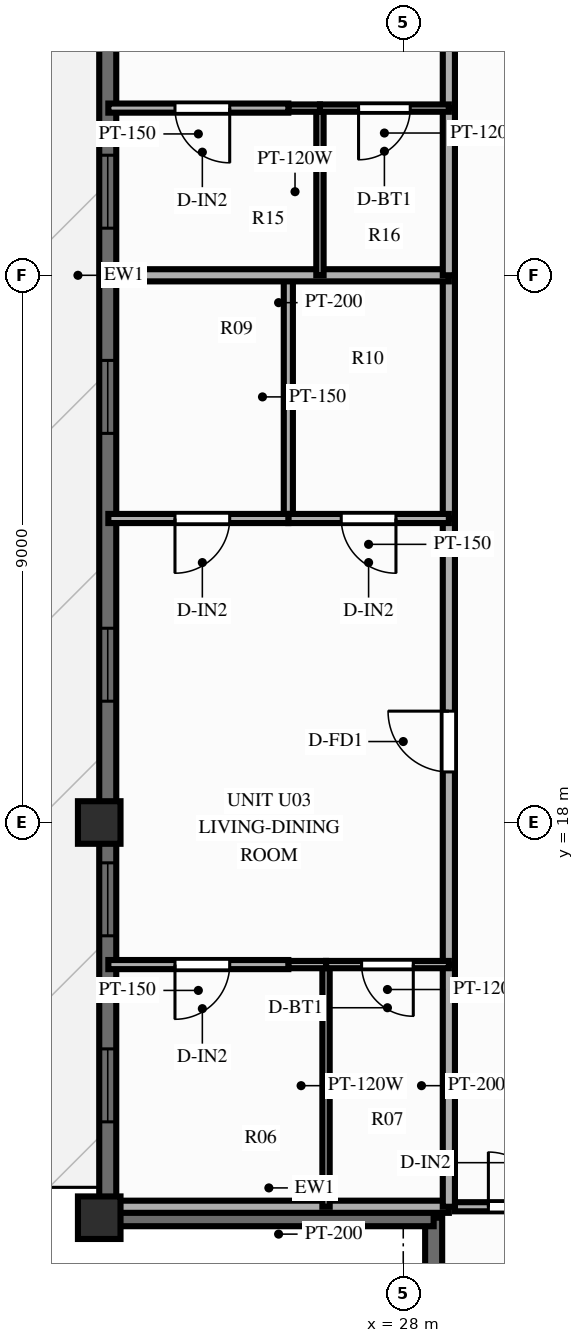
"""IFC4 building model, lengths in metres.
Left out: names, types, materials, properties, quantities, classifications, styles, units other than length and angle.
Written with IfcOpenShell. Run it as: python <this file> out.ifc"""

import sys

from ifc_helpers import new_model, si_unit, direction, frame, frame_2d, origin, origin_2d, place, context, subcontext, project, spatial, rectangle, extrude, source, transform, mapped, element, fill, save


model = new_model("IFC4")
c1 = context("Model", 3, precision=1e-05, world=origin(), true_north=direction((0.0, 1.0)))
c2 = subcontext(c1, "Body", "Model", "MODEL_VIEW")
j1 = project(units=[si_unit("LENGTHUNIT", "METRE"), si_unit("PLANEANGLEUNIT", "RADIAN")], contexts=[c1])
p1 = place(None, origin())
s1 = spatial("IfcSite", under=j1, at=p1, CompositionType="ELEMENT")
p2 = place(p1, origin())
s2 = spatial("IfcBuilding", under=s1, at=p2, CompositionType="ELEMENT")
p3 = place(p2, frame((0.0, 0.0, 243.0)))
s3 = spatial("IfcBuildingStorey", under=s2, at=p3, CompositionType="ELEMENT", Elevation=243.0)
m1 = source(origin(), c2, "Body", "SweptSolid", [
    extrude(rectangle(XDim=0.7, YDim=0.7, at=origin_2d()), origin(), (0.0, 0.0, 1.0), 3.0),
])
for number, where, z_axis, x_axis in (
    (1, (23.0, 18.0, 0.0), (0.0, 0.0, 1.0), (1.0, 0.0, 0.0)),
    (2, (23.0, 11.5, 0.0), (0.0, 0.0, 1.0), (1.0, 0.0, 0.0)),
):
    element("IfcColumn", number, at=place(p3, frame(where, z_axis=z_axis, x_axis=x_axis)), inside=s3, PredefinedType="COLUMN", context=c2, shape_type="MappedRepresentation", body=[
        mapped(m1, transform((0.0, 0.0, 0.0), scale=1.0)),
    ])
p4 = place(p3, frame((23.14, 11.5, 0.0), z_axis=(0.0, 0.0, 1.0), x_axis=(0.0, 1.0, 0.0)))
e3 = element("IfcWall", 3, at=p4, inside=s3, PredefinedType="SOLIDWALL", context=c2, shape_type="SweptSolid", body=[
    extrude(rectangle(XDim=31.0, YDim=0.28, at=frame_2d((15.5, 0.0))), origin(), (0.0, 0.0, 1.0), 2.28),
])
p5 = place(p4, frame((1.577, 0.0, 0.25)))
e4 = element("IfcOpeningElement", 4, at=p5, cuts=e3, PredefinedType="OPENING", context=c2, shape_type="SweptSolid", body=[
    extrude(rectangle(XDim=1.2, YDim=1.5, at=frame_2d((0.6, 0.75))), frame((0.0, 0.152, 0.0), z_axis=(0.0, -1.0, 0.0), x_axis=(1.0, 0.0, 0.0)), (0.0, 0.0, 1.0), 0.304),
])
p6 = place(p4, frame((4.637, 0.0, 0.25)))
e5 = element("IfcOpeningElement", 5, at=p6, cuts=e3, PredefinedType="OPENING", context=c2, shape_type="SweptSolid", body=[
    extrude(rectangle(XDim=1.2, YDim=1.5, at=frame_2d((0.6, 0.75))), frame((0.0, 0.152, 0.0), z_axis=(0.0, -1.0, 0.0), x_axis=(1.0, 0.0, 0.0)), (0.0, 0.0, 1.0), 0.304),
])
p7 = place(p4, frame((8.495, 0.0, 0.25)))
e6 = element("IfcOpeningElement", 6, at=p7, cuts=e3, PredefinedType="OPENING", context=c2, shape_type="SweptSolid", body=[
    extrude(rectangle(XDim=1.2, YDim=1.5, at=frame_2d((0.6, 0.75))), frame((0.0, 0.152, 0.0), z_axis=(0.0, -1.0, 0.0), x_axis=(1.0, 0.0, 0.0)), (0.0, 0.0, 1.0), 0.304),
])
p8 = place(p4, frame((12.9, 0.0, 0.25)))
e7 = element("IfcOpeningElement", 7, at=p8, cuts=e3, PredefinedType="OPENING", context=c2, shape_type="SweptSolid", body=[
    extrude(rectangle(XDim=1.2, YDim=1.5, at=frame_2d((0.6, 0.75))), frame((0.0, 0.152, 0.0), z_axis=(0.0, -1.0, 0.0), x_axis=(1.0, 0.0, 0.0)), (0.0, 0.0, 1.0), 0.304),
])
p9 = place(p4, frame((16.275, 0.0, 0.25)))
e8 = element("IfcOpeningElement", 8, at=p9, cuts=e3, PredefinedType="OPENING", context=c2, shape_type="SweptSolid", body=[
    extrude(rectangle(XDim=1.2, YDim=1.5, at=frame_2d((0.6, 0.75))), frame((0.0, 0.152, 0.0), z_axis=(0.0, -1.0, 0.0), x_axis=(1.0, 0.0, 0.0)), (0.0, 0.0, 1.0), 0.304),
])
p10 = place(p4, frame((20.48, 0.0, 0.0)))
e9 = element("IfcOpeningElement", 9, at=p10, cuts=e3, PredefinedType="OPENING", context=c2, shape_type="SweptSolid", body=[
    extrude(rectangle(XDim=1.6, YDim=2.15, at=frame_2d((0.8, 1.075))), frame((0.0, 0.152, 0.0), z_axis=(0.0, -1.0, 0.0), x_axis=(1.0, 0.0, 0.0)), (0.0, 0.0, 1.0), 0.304),
])
p11 = place(p4, frame((25.155, 0.0, 0.25)))
e10 = element("IfcOpeningElement", 10, at=p11, cuts=e3, PredefinedType="OPENING", context=c2, shape_type="SweptSolid", body=[
    extrude(rectangle(XDim=1.2, YDim=1.5, at=frame_2d((0.6, 0.75))), frame((0.0, 0.152, 0.0), z_axis=(0.0, -1.0, 0.0), x_axis=(1.0, 0.0, 0.0)), (0.0, 0.0, 1.0), 0.304),
])
p12 = place(p4, frame((28.215, 0.0, 0.25)))
e11 = element("IfcOpeningElement", 11, at=p12, cuts=e3, PredefinedType="OPENING", context=c2, shape_type="SweptSolid", body=[
    extrude(rectangle(XDim=1.2, YDim=1.5, at=frame_2d((0.6, 0.75))), frame((0.0, 0.152, 0.0), z_axis=(0.0, -1.0, 0.0), x_axis=(1.0, 0.0, 0.0)), (0.0, 0.0, 1.0), 0.304),
])
for number, where, z_axis, x_axis in (
    (12, (28.5, 6.08, 0.0), (0.0, 0.0, 1.0), (0.0, 1.0, 0.0)),
    (13, (23.08, 11.5, 0.0), (0.0, 0.0, 1.0), (1.0, 0.0, 0.0)),
):
    element("IfcWall", number, at=place(p3, frame(where, z_axis=z_axis, x_axis=x_axis)), inside=s3, PredefinedType="SOLIDWALL", context=c2, shape_type="SweptSolid", body=[
        extrude(rectangle(XDim=5.42, YDim=0.28, at=frame_2d((2.71, 0.0))), origin(), (0.0, 0.0, 1.0), 2.28),
    ])
p13 = place(p3, frame((28.85, 11.68, 0.0), z_axis=(0.0, 0.0, 1.0), x_axis=(1.0, 0.0, 0.0)))
e14 = element("IfcWall", 14, at=p13, inside=s3, PredefinedType="PARTITIONING", context=c2, shape_type="SweptSolid", body=[
    extrude(rectangle(XDim=2.33, YDim=0.15, at=frame_2d((1.165, 0.0))), origin(), (0.0, 0.0, 1.0), 2.79),
])
p14 = place(p13, frame((0.55, 0.0, 0.0)))
e15 = element("IfcOpeningElement", 15, at=p14, cuts=e14, PredefinedType="OPENING", context=c2, shape_type="SweptSolid", body=[
    extrude(rectangle(XDim=0.9, YDim=2.1, at=frame_2d((0.45, 1.05))), frame((0.0, 0.087, 0.0), z_axis=(0.0, -1.0, 0.0), x_axis=(1.0, 0.0, 0.0)), (0.0, 0.0, 1.0), 0.174),
])
p15 = place(p3, frame((28.75, 11.68, 0.0), z_axis=(0.0, 0.0, 1.0), x_axis=(-1.0, 0.0, 0.0)))
e16 = element("IfcWall", 16, at=p15, inside=s3, PredefinedType="PARTITIONING", context=c2, shape_type="SweptSolid", body=[
    extrude(rectangle(XDim=5.6, YDim=0.2, at=frame_2d((2.8, 0.0))), origin(), (0.0, 0.0, 1.0), 2.79),
])
p16 = place(p3, frame((28.75, 11.68, 0.0), z_axis=(0.0, 0.0, 1.0), x_axis=(0.0, 1.0, 0.0)))
e17 = element("IfcWall", 17, at=p16, inside=s3, PredefinedType="PARTITIONING", context=c2, shape_type="SweptSolid", body=[
    extrude(rectangle(XDim=3.983, YDim=0.2, at=frame_2d((1.992, 0.0))), origin(), (0.0, 0.0, 1.0), 2.79),
])
p17 = place(p3, frame((28.75, 15.663, 0.0), z_axis=(0.0, 0.0, 1.0), x_axis=(0.0, 1.0, 0.0)))
e18 = element("IfcWall", 18, at=p17, inside=s3, PredefinedType="PARTITIONING", context=c2, shape_type="SweptSolid", body=[
    extrude(rectangle(XDim=7.337, YDim=0.2, at=frame_2d((3.668, 0.0))), origin(), (0.0, 0.0, 1.0), 2.79),
])
p18 = place(p17, frame((3.168, 0.0, 0.0)))
e19 = element("IfcOpeningElement", 19, at=p18, cuts=e18, PredefinedType="OPENING", context=c2, shape_type="SweptSolid", body=[
    extrude(rectangle(XDim=1.0, YDim=2.15, at=frame_2d((0.5, 1.075))), frame((0.0, 0.112, 0.0), z_axis=(0.0, -1.0, 0.0), x_axis=(1.0, 0.0, 0.0)), (0.0, 0.0, 1.0), 0.224),
])
p19 = place(p3, frame((28.75, 23.0, 0.0), z_axis=(0.0, 0.0, 1.0), x_axis=(0.0, 1.0, 0.0)))
e20 = element("IfcWall", 20, at=p19, inside=s3, PredefinedType="PARTITIONING", context=c2, shape_type="SweptSolid", body=[
    extrude(rectangle(XDim=4.0, YDim=0.2, at=frame_2d((2.0, 0.0))), origin(), (0.0, 0.0, 1.0), 2.79),
])
p20 = place(p3, frame((26.73, 11.68, 0.0), z_axis=(0.0, 0.0, 1.0), x_axis=(0.0, 1.0, 0.0)))
e21 = element("IfcWall", 21, at=p20, inside=s3, PredefinedType="PARTITIONING", context=c2, shape_type="SweptSolid", body=[
    extrude(rectangle(XDim=3.983, YDim=0.12, at=frame_2d((1.992, 0.0))), origin(), (0.0, 0.0, 1.0), 2.79),
])
p21 = place(p3, frame((26.11, 23.0, 0.0), z_axis=(0.0, 0.0, 1.0), x_axis=(0.0, 1.0, 0.0)))
e22 = element("IfcWall", 22, at=p21, inside=s3, PredefinedType="PARTITIONING", context=c2, shape_type="SweptSolid", body=[
    extrude(rectangle(XDim=4.0, YDim=0.15, at=frame_2d((2.0, 0.0))), origin(), (0.0, 0.0, 1.0), 2.79),
])
p22 = place(p3, frame((28.75, 15.663, 0.0), z_axis=(0.0, 0.0, 1.0), x_axis=(-1.0, 0.0, 0.0)))
e23 = element("IfcWall", 23, at=p22, inside=s3, PredefinedType="PARTITIONING", context=c2, shape_type="SweptSolid", body=[
    extrude(rectangle(XDim=2.02, YDim=0.12, at=frame_2d((1.01, 0.0))), origin(), (0.0, 0.0, 1.0), 2.79),
])
p23 = place(p22, frame((0.585, 0.0, 0.0)))
e24 = element("IfcOpeningElement", 24, at=p23, cuts=e23, PredefinedType="OPENING", context=c2, shape_type="SweptSolid", body=[
    extrude(rectangle(XDim=0.85, YDim=2.05, at=frame_2d((0.425, 1.025))), frame((0.0, 0.072, 0.0), z_axis=(0.0, -1.0, 0.0), x_axis=(1.0, 0.0, 0.0)), (0.0, 0.0, 1.0), 0.144),
])
p24 = place(p3, frame((26.73, 15.663, 0.0), z_axis=(0.0, 0.0, 1.0), x_axis=(-1.0, 0.0, 0.0)))
e25 = element("IfcWall", 25, at=p24, inside=s3, PredefinedType="PARTITIONING", context=c2, shape_type="SweptSolid", body=[
    extrude(rectangle(XDim=0.62, YDim=0.12, at=frame_2d((0.31, 0.0))), origin(), (0.0, 0.0, 1.0), 2.79),
])
p25 = place(p3, frame((26.11, 15.663, 0.0), z_axis=(0.0, 0.0, 1.0), x_axis=(-1.0, 0.0, 0.0)))
e26 = element("IfcWall", 26, at=p25, inside=s3, PredefinedType="PARTITIONING", context=c2, shape_type="SweptSolid", body=[
    extrude(rectangle(XDim=2.96, YDim=0.15, at=frame_2d((1.48, 0.0))), origin(), (0.0, 0.0, 1.0), 2.79),
])
p26 = place(p25, frame((0.964, 0.0, 0.0)))
e27 = element("IfcOpeningElement", 27, at=p26, cuts=e26, PredefinedType="OPENING", context=c2, shape_type="SweptSolid", body=[
    extrude(rectangle(XDim=0.9, YDim=2.1, at=frame_2d((0.45, 1.05))), frame((0.0, 0.087, 0.0), z_axis=(0.0, -1.0, 0.0), x_axis=(1.0, 0.0, 0.0)), (0.0, 0.0, 1.0), 0.174),
])
p27 = place(p3, frame((28.75, 23.0, 0.0), z_axis=(0.0, 0.0, 1.0), x_axis=(-1.0, 0.0, 0.0)))
e28 = element("IfcWall", 28, at=p27, inside=s3, PredefinedType="PARTITIONING", context=c2, shape_type="SweptSolid", body=[
    extrude(rectangle(XDim=2.64, YDim=0.15, at=frame_2d((1.32, 0.0))), origin(), (0.0, 0.0, 1.0), 2.79),
])
p28 = place(p27, frame((0.87, 0.0, 0.0)))
e29 = element("IfcOpeningElement", 29, at=p28, cuts=e28, PredefinedType="OPENING", context=c2, shape_type="SweptSolid", body=[
    extrude(rectangle(XDim=0.9, YDim=2.1, at=frame_2d((0.45, 1.05))), frame((0.0, 0.087, 0.0), z_axis=(0.0, -1.0, 0.0), x_axis=(1.0, 0.0, 0.0)), (0.0, 0.0, 1.0), 0.174),
])
p29 = place(p3, frame((26.11, 23.0, 0.0), z_axis=(0.0, 0.0, 1.0), x_axis=(-1.0, 0.0, 0.0)))
e30 = element("IfcWall", 30, at=p29, inside=s3, PredefinedType="PARTITIONING", context=c2, shape_type="SweptSolid", body=[
    extrude(rectangle(XDim=2.96, YDim=0.15, at=frame_2d((1.48, 0.0))), origin(), (0.0, 0.0, 1.0), 2.79),
])
p30 = place(p29, frame((0.964, 0.0, 0.0)))
e31 = element("IfcOpeningElement", 31, at=p30, cuts=e30, PredefinedType="OPENING", context=c2, shape_type="SweptSolid", body=[
    extrude(rectangle(XDim=0.9, YDim=2.1, at=frame_2d((0.45, 1.05))), frame((0.0, 0.087, 0.0), z_axis=(0.0, -1.0, 0.0), x_axis=(1.0, 0.0, 0.0)), (0.0, 0.0, 1.0), 0.174),
])
p31 = place(p3, frame((28.75, 27.0, 0.0), z_axis=(0.0, 0.0, 1.0), x_axis=(-1.0, 0.0, 0.0)))
e32 = element("IfcWall", 32, at=p31, inside=s3, PredefinedType="PARTITIONING", context=c2, shape_type="SweptSolid", body=[
    extrude(rectangle(XDim=5.6, YDim=0.2, at=frame_2d((2.8, 0.0))), origin(), (0.0, 0.0, 1.0), 2.79),
])
p32 = place(p3, frame((28.75, 27.0, 0.0), z_axis=(0.0, 0.0, 1.0), x_axis=(0.0, 1.0, 0.0)))
e33 = element("IfcWall", 33, at=p32, inside=s3, PredefinedType="PARTITIONING", context=c2, shape_type="SweptSolid", body=[
    extrude(rectangle(XDim=2.75, YDim=0.2, at=frame_2d((1.375, 0.0))), origin(), (0.0, 0.0, 1.0), 2.79),
])
p33 = place(p3, frame((28.75, 29.75, 0.0), z_axis=(0.0, 0.0, 1.0), x_axis=(0.0, 1.0, 0.0)))
e34 = element("IfcWall", 34, at=p33, inside=s3, PredefinedType="PARTITIONING", context=c2, shape_type="SweptSolid", body=[
    extrude(rectangle(XDim=8.57, YDim=0.2, at=frame_2d((4.285, 0.0))), origin(), (0.0, 0.0, 1.0), 2.79),
])
p34 = place(p33, frame((3.785, 0.0, 0.0)))
e35 = element("IfcOpeningElement", 35, at=p34, cuts=e34, PredefinedType="OPENING", context=c2, shape_type="SweptSolid", body=[
    extrude(rectangle(XDim=1.0, YDim=2.15, at=frame_2d((0.5, 1.075))), frame((0.0, 0.112, 0.0), z_axis=(0.0, -1.0, 0.0), x_axis=(1.0, 0.0, 0.0)), (0.0, 0.0, 1.0), 0.224),
])
p35 = place(p3, frame((26.63, 27.0, 0.0), z_axis=(0.0, 0.0, 1.0), x_axis=(0.0, 1.0, 0.0)))
e36 = element("IfcWall", 36, at=p35, inside=s3, PredefinedType="PARTITIONING", context=c2, shape_type="SweptSolid", body=[
    extrude(rectangle(XDim=2.75, YDim=0.12, at=frame_2d((1.375, 0.0))), origin(), (0.0, 0.0, 1.0), 2.39),
])
p36 = place(p3, frame((28.75, 29.75, 0.0), z_axis=(0.0, 0.0, 1.0), x_axis=(-1.0, 0.0, 0.0)))
e37 = element("IfcWall", 37, at=p36, inside=s3, PredefinedType="PARTITIONING", context=c2, shape_type="SweptSolid", body=[
    extrude(rectangle(XDim=2.12, YDim=0.12, at=frame_2d((1.06, 0.0))), origin(), (0.0, 0.0, 1.0), 2.79),
])
p37 = place(p36, frame((0.635, 0.0, 0.0)))
e38 = element("IfcOpeningElement", 38, at=p37, cuts=e37, PredefinedType="OPENING", context=c2, shape_type="SweptSolid", body=[
    extrude(rectangle(XDim=0.85, YDim=2.05, at=frame_2d((0.425, 1.025))), frame((0.0, 0.072, 0.0), z_axis=(0.0, -1.0, 0.0), x_axis=(1.0, 0.0, 0.0)), (0.0, 0.0, 1.0), 0.144),
])
p38 = place(p3, frame((26.63, 29.75, 0.0), z_axis=(0.0, 0.0, 1.0), x_axis=(-1.0, 0.0, 0.0)))
e39 = element("IfcWall", 39, at=p38, inside=s3, PredefinedType="PARTITIONING", context=c2, shape_type="SweptSolid", body=[
    extrude(rectangle(XDim=0.52, YDim=0.12, at=frame_2d((0.26, 0.0))), origin(), (0.0, 0.0, 1.0), 2.79),
])
p39 = place(p3, frame((26.11, 29.75, 0.0), z_axis=(0.0, 0.0, 1.0), x_axis=(-1.0, 0.0, 0.0)))
e40 = element("IfcWall", 40, at=p39, inside=s3, PredefinedType="PARTITIONING", context=c2, shape_type="SweptSolid", body=[
    extrude(rectangle(XDim=2.96, YDim=0.15, at=frame_2d((1.48, 0.0))), origin(), (0.0, 0.0, 1.0), 2.79),
])
p40 = place(p39, frame((0.964, 0.0, 0.0)))
e41 = element("IfcOpeningElement", 41, at=p40, cuts=e40, PredefinedType="OPENING", context=c2, shape_type="SweptSolid", body=[
    extrude(rectangle(XDim=0.9, YDim=2.1, at=frame_2d((0.45, 1.05))), frame((0.0, 0.087, 0.0), z_axis=(0.0, -1.0, 0.0), x_axis=(1.0, 0.0, 0.0)), (0.0, 0.0, 1.0), 0.174),
])
m2 = source(origin(), c2, "Body", "SweptSolid", [
    extrude(rectangle(XDim=1.2, YDim=1.5, at=frame_2d((0.6, 0.75))), frame((0.0, 0.03, 0.0), z_axis=(0.0, -1.0, 0.0), x_axis=(1.0, 0.0, 0.0)), (0.0, 0.0, 1.0), 0.06),
])
p41 = place(p5, origin())
e42 = element("IfcWindow", 42, at=p41, inside=s3, PartitioningType="SINGLE_PANEL", PredefinedType="WINDOW", context=c2, shape_type="MappedRepresentation", body=[
    mapped(m2, transform((0.0, 0.0, 0.0), scale=1.0)),
])
fill(e4, e42)
p42 = place(p6, origin())
e43 = element("IfcWindow", 43, at=p42, inside=s3, PartitioningType="SINGLE_PANEL", PredefinedType="WINDOW", context=c2, shape_type="MappedRepresentation", body=[
    mapped(m2, transform((0.0, 0.0, 0.0), scale=1.0)),
])
fill(e5, e43)
p43 = place(p7, origin())
e44 = element("IfcWindow", 44, at=p43, inside=s3, PartitioningType="SINGLE_PANEL", PredefinedType="WINDOW", context=c2, shape_type="MappedRepresentation", body=[
    mapped(m2, transform((0.0, 0.0, 0.0), scale=1.0)),
])
fill(e6, e44)
p44 = place(p8, origin())
e45 = element("IfcWindow", 45, at=p44, inside=s3, PartitioningType="SINGLE_PANEL", PredefinedType="WINDOW", context=c2, shape_type="MappedRepresentation", body=[
    mapped(m2, transform((0.0, 0.0, 0.0), scale=1.0)),
])
fill(e7, e45)
p45 = place(p9, origin())
e46 = element("IfcWindow", 46, at=p45, inside=s3, PartitioningType="SINGLE_PANEL", PredefinedType="WINDOW", context=c2, shape_type="MappedRepresentation", body=[
    mapped(m2, transform((0.0, 0.0, 0.0), scale=1.0)),
])
fill(e8, e46)
m3 = source(origin(), c2, "Body", "SweptSolid", [
    extrude(rectangle(XDim=0.9, YDim=2.1, at=frame_2d((0.45, 1.05))), frame((0.0, 0.025, 0.0), z_axis=(0.0, -1.0, 0.0), x_axis=(1.0, 0.0, 0.0)), (0.0, 0.0, 1.0), 0.05),
])
p46 = place(p14, origin())
e47 = element("IfcDoor", 47, at=p46, inside=s3, OperationType="SINGLE_SWING_LEFT", PredefinedType="DOOR", context=c2, shape_type="MappedRepresentation", body=[
    mapped(m3, transform((0.0, 0.0, 0.0), scale=1.0)),
])
fill(e15, e47)
m4 = source(origin(), c2, "Body", "SweptSolid", [
    extrude(rectangle(XDim=1.0, YDim=2.15, at=frame_2d((0.5, 1.075))), frame((0.0, 0.025, 0.0), z_axis=(0.0, -1.0, 0.0), x_axis=(1.0, 0.0, 0.0)), (0.0, 0.0, 1.0), 0.05),
])
p47 = place(p18, origin())
e48 = element("IfcDoor", 48, at=p47, inside=s3, OperationType="SINGLE_SWING_RIGHT", PredefinedType="DOOR", context=c2, shape_type="MappedRepresentation", body=[
    mapped(m4, transform((0.0, 0.0, 0.0), scale=1.0)),
])
fill(e19, e48)
m5 = source(origin(), c2, "Body", "SweptSolid", [
    extrude(rectangle(XDim=0.85, YDim=2.05, at=frame_2d((0.425, 1.025))), frame((0.0, 0.025, 0.0), z_axis=(0.0, -1.0, 0.0), x_axis=(1.0, 0.0, 0.0)), (0.0, 0.0, 1.0), 0.05),
])
p48 = place(p23, origin())
e49 = element("IfcDoor", 49, at=p48, inside=s3, OperationType="SINGLE_SWING_LEFT", PredefinedType="DOOR", context=c2, shape_type="MappedRepresentation", body=[
    mapped(m5, transform((0.0, 0.0, 0.0), scale=1.0)),
])
fill(e24, e49)
p49 = place(p26, origin())
e50 = element("IfcDoor", 50, at=p49, inside=s3, OperationType="SINGLE_SWING_RIGHT", PredefinedType="DOOR", context=c2, shape_type="MappedRepresentation", body=[
    mapped(m3, transform((0.0, 0.0, 0.0), scale=1.0)),
])
fill(e27, e50)
p50 = place(p28, origin())
e51 = element("IfcDoor", 51, at=p50, inside=s3, OperationType="SINGLE_SWING_LEFT", PredefinedType="DOOR", context=c2, shape_type="MappedRepresentation", body=[
    mapped(m3, transform((0.0, 0.0, 0.0), scale=1.0)),
])
fill(e29, e51)
p51 = place(p30, origin())
e52 = element("IfcDoor", 52, at=p51, inside=s3, OperationType="SINGLE_SWING_RIGHT", PredefinedType="DOOR", context=c2, shape_type="MappedRepresentation", body=[
    mapped(m3, transform((0.0, 0.0, 0.0), scale=1.0)),
])
fill(e31, e52)
p52 = place(p37, origin())
e53 = element("IfcDoor", 53, at=p52, inside=s3, OperationType="SINGLE_SWING_RIGHT", PredefinedType="DOOR", context=c2, shape_type="MappedRepresentation", body=[
    mapped(m5, transform((0.0, 0.0, 0.0), scale=1.0)),
])
fill(e38, e53)
p53 = place(p40, origin())
e54 = element("IfcDoor", 54, at=p53, inside=s3, OperationType="SINGLE_SWING_LEFT", PredefinedType="DOOR", context=c2, shape_type="MappedRepresentation", body=[
    mapped(m3, transform((0.0, 0.0, 0.0), scale=1.0)),
])
fill(e41, e54)
save(model, sys.argv[1])
